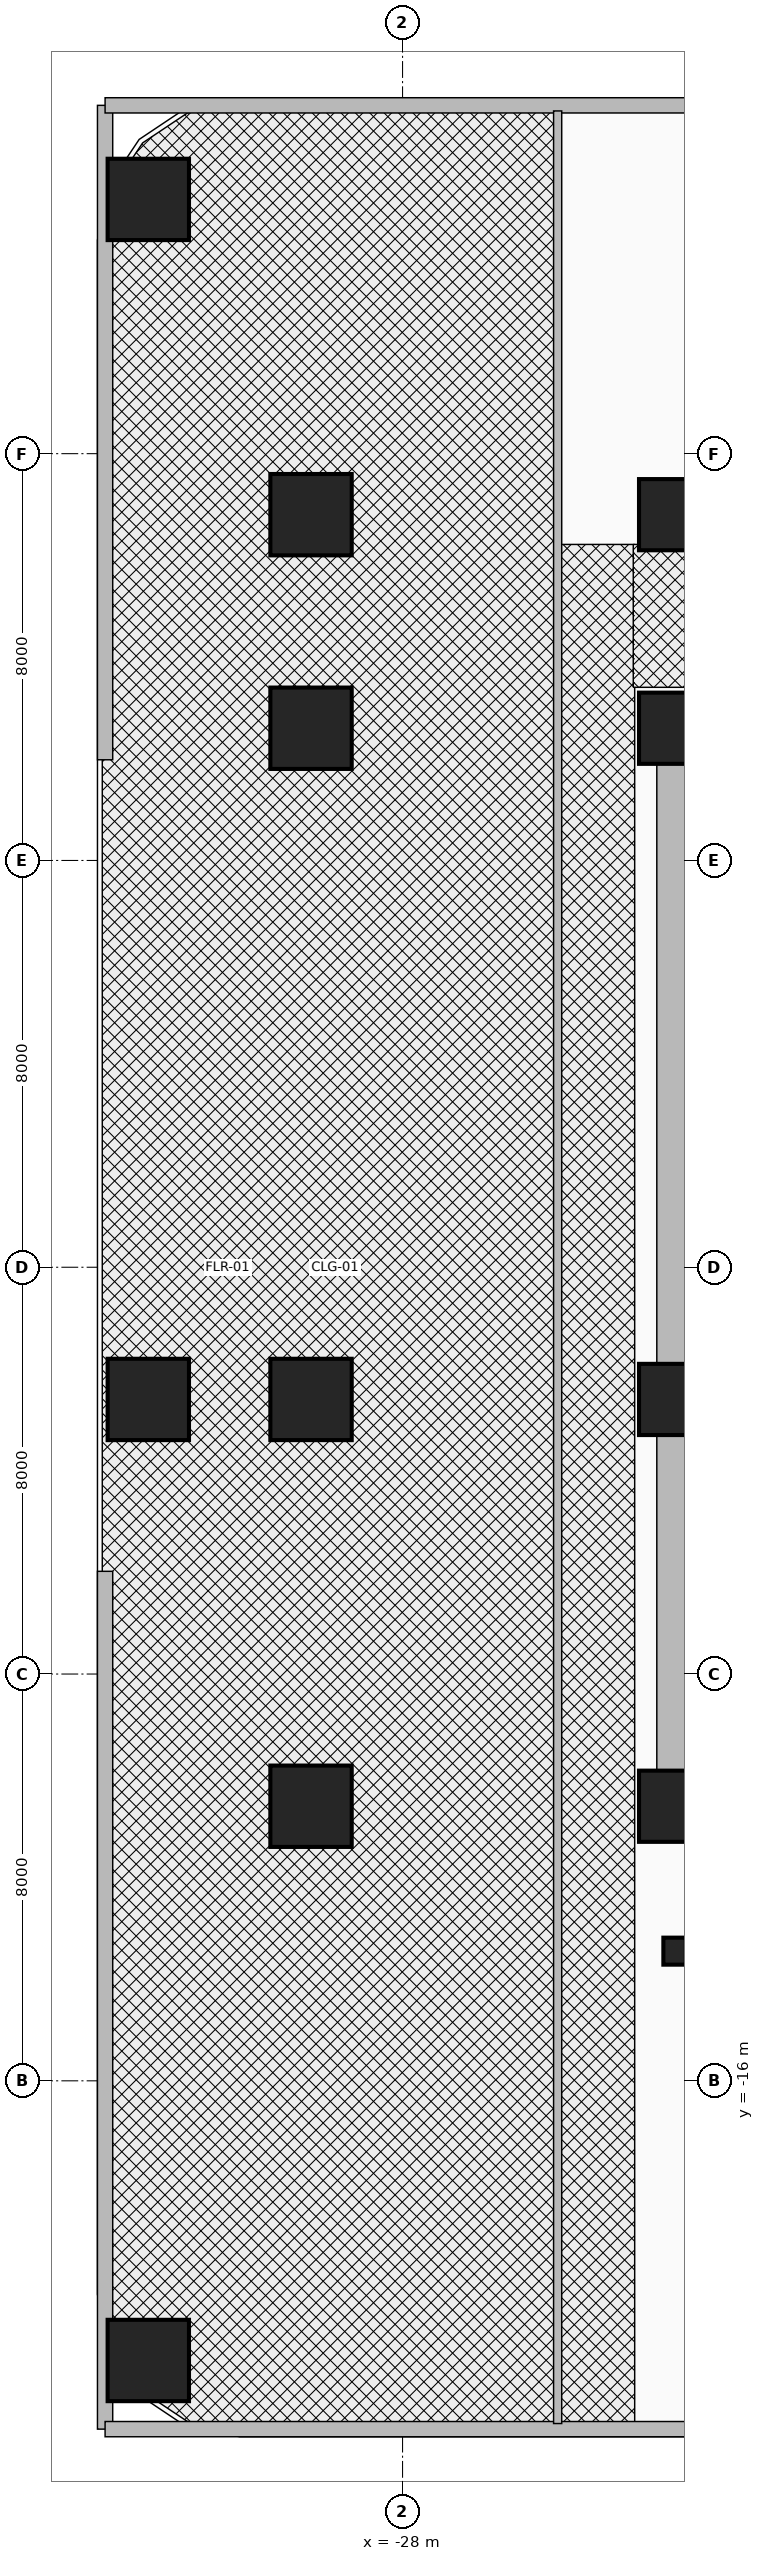
"""IFC4 building model, lengths in metres.
Left out: names, types, materials, properties, quantities, classifications, styles, units other than length and angle.
Written with IfcOpenShell. Run it as: python <this file> out.ifc"""

import sys

from ifc_helpers import new_model, si_unit, direction, frame, frame_2d, origin, origin_2d, place, context, subcontext, project, spatial, rectangle, i_section, extrude, source, transform, mapped, element, fill, save


model = new_model("IFC4")
c1 = context("Model", 3, precision=1e-05, world=origin(), true_north=direction((0.0, 1.0)))
c2 = subcontext(c1, "Body", "Model", "MODEL_VIEW")
j1 = project(units=[si_unit("LENGTHUNIT", "METRE"), si_unit("PLANEANGLEUNIT", "RADIAN")], contexts=[c1])
p1 = place(None, origin())
s1 = spatial("IfcSite", under=j1, at=p1, CompositionType="ELEMENT")
p2 = place(p1, origin())
s2 = spatial("IfcBuilding", under=s1, at=p2, CompositionType="ELEMENT")
p3 = place(p2, frame((0.0, 0.0, 10.4)))
s3 = spatial("IfcBuildingStorey", under=s2, at=p3, CompositionType="ELEMENT", Elevation=10.4)
p4 = place(p3, frame((-22.65, -11.15, 0.0), z_axis=(0.0, 0.0, 1.0), x_axis=(0.0, 1.0, 0.0)))
e1 = element("IfcWall", 1, at=p4, inside=s3, PredefinedType="SHEAR", context=c2, shape_type="SweptSolid", body=[
    extrude(rectangle(XDim=22.3, YDim=0.7, at=frame_2d((11.15, 0.0))), origin(), (0.0, 0.0, 1.0), 4.92),
])
for number, where, z_axis, x_axis in (
    (2, (-22.65, 10.8, 0.0), (0.0, 0.0, 1.0), (1.0, 0.0, 0.0)),
    (3, (-22.65, -10.8, 0.0), (0.0, 0.0, 1.0), (1.0, 0.0, 0.0)),
):
    element("IfcWall", number, at=place(p3, frame(where, z_axis=z_axis, x_axis=x_axis)), inside=s3, PredefinedType="SHEAR", context=c2, shape_type="SweptSolid", body=[
        extrude(rectangle(XDim=10.25, YDim=0.7, at=frame_2d((5.125, 0.0))), origin(), (0.0, 0.0, 1.0), 4.92),
    ])
m1 = source(origin(), c2, "Body", "SweptSolid", [
    extrude(rectangle(XDim=1.6, YDim=1.6, at=origin_2d()), origin(), (0.0, 0.0, 1.0), 5.2),
])
p5 = place(p3, frame((-29.8, -10.6, 0.0), z_axis=(0.0, 0.0, 1.0), x_axis=(1.0, 0.0, 0.0)))
e4 = element("IfcColumn", 4, at=p5, inside=s3, PredefinedType="COLUMN", context=c2, shape_type="MappedRepresentation", body=[
    mapped(m1, transform((0.0, 0.0, 0.0), x_axis=(1.0, 0.0, 0.0), y_axis=(0.0, 1.0, 0.0), z_axis=(0.0, 0.0, 1.0), scale=1.0)),
])
m2 = source(origin(), c2, "Body", "SweptSolid", [
    extrude(rectangle(XDim=1.4, YDim=1.4, at=origin_2d()), origin(), (0.0, 0.0, 1.0), 5.2),
])
p6 = place(p3, frame((-22.65, -10.6, 0.0), z_axis=(0.0, 0.0, 1.0), x_axis=(1.0, 0.0, 0.0)))
e5 = element("IfcColumn", 5, at=p6, inside=s3, PredefinedType="COLUMN", context=c2, shape_type="MappedRepresentation", body=[
    mapped(m2, transform((0.0, 0.0, 0.0), x_axis=(1.0, 0.0, 0.0), y_axis=(0.0, 1.0, 0.0), z_axis=(0.0, 0.0, 1.0), scale=1.0)),
])
p7 = place(p3, frame((-29.8, -2.6, 0.0), z_axis=(0.0, 0.0, 1.0), x_axis=(1.0, 0.0, 0.0)))
e6 = element("IfcColumn", 6, at=p7, inside=s3, PredefinedType="COLUMN", context=c2, shape_type="MappedRepresentation", body=[
    mapped(m1, transform((0.0, 0.0, 0.0), x_axis=(1.0, 0.0, 0.0), y_axis=(0.0, 1.0, 0.0), z_axis=(0.0, 0.0, 1.0), scale=1.0)),
])
p8 = place(p3, frame((-22.65, -2.6, 0.0), z_axis=(0.0, 0.0, 1.0), x_axis=(1.0, 0.0, 0.0)))
e7 = element("IfcColumn", 7, at=p8, inside=s3, PredefinedType="COLUMN", context=c2, shape_type="MappedRepresentation", body=[
    mapped(m2, transform((0.0, 0.0, 0.0), x_axis=(1.0, 0.0, 0.0), y_axis=(0.0, 1.0, 0.0), z_axis=(0.0, 0.0, 1.0), scale=1.0)),
])
p9 = place(p3, frame((-29.8, 10.6, 0.0), z_axis=(0.0, 0.0, 1.0), x_axis=(1.0, 0.0, 0.0)))
e8 = element("IfcColumn", 8, at=p9, inside=s3, PredefinedType="COLUMN", context=c2, shape_type="MappedRepresentation", body=[
    mapped(m1, transform((0.0, 0.0, 0.0), x_axis=(1.0, 0.0, 0.0), y_axis=(0.0, 1.0, 0.0), z_axis=(0.0, 0.0, 1.0), scale=1.0)),
])
p10 = place(p3, frame((-22.65, 10.6, 0.0), z_axis=(0.0, 0.0, 1.0), x_axis=(1.0, 0.0, 0.0)))
e9 = element("IfcColumn", 9, at=p10, inside=s3, PredefinedType="COLUMN", context=c2, shape_type="MappedRepresentation", body=[
    mapped(m2, transform((0.0, 0.0, 0.0), x_axis=(1.0, 0.0, 0.0), y_axis=(0.0, 1.0, 0.0), z_axis=(0.0, 0.0, 1.0), scale=1.0)),
])
p11 = place(p3, frame((-29.8, 14.8, 0.0), z_axis=(0.0, 0.0, 1.0), x_axis=(1.0, 0.0, 0.0)))
e10 = element("IfcColumn", 10, at=p11, inside=s3, PredefinedType="COLUMN", context=c2, shape_type="MappedRepresentation", body=[
    mapped(m1, transform((0.0, 0.0, 0.0), x_axis=(1.0, 0.0, 0.0), y_axis=(0.0, 1.0, 0.0), z_axis=(0.0, 0.0, 1.0), scale=1.0)),
])
p12 = place(p3, frame((-22.65, 14.8, 0.0), z_axis=(0.0, 0.0, 1.0), x_axis=(1.0, 0.0, 0.0)))
e11 = element("IfcColumn", 11, at=p12, inside=s3, PredefinedType="COLUMN", context=c2, shape_type="MappedRepresentation", body=[
    mapped(m2, transform((0.0, 0.0, 0.0), x_axis=(1.0, 0.0, 0.0), y_axis=(0.0, 1.0, 0.0), z_axis=(0.0, 0.0, 1.0), scale=1.0)),
])
m3 = source(origin(), c2, "Body", "SweptSolid", [
    extrude(i_section(OverallWidth=0.442, OverallDepth=0.531, WebThickness=0.066, FlangeThickness=0.106, at=origin_2d()), origin(), (0.0, 0.0, 1.0), 5.2),
])
p13 = place(p3, frame((-22.65, -13.45, 0.0), z_axis=(0.0, 0.0, 1.0), x_axis=(1.0, 0.0, 0.0)))
e12 = element("IfcColumn", 12, at=p13, inside=s3, PredefinedType="COLUMN", context=c2, shape_type="MappedRepresentation", body=[
    mapped(m3, transform((0.0, 0.0, 0.0), x_axis=(1.0, 0.0, 0.0), y_axis=(0.0, 1.0, 0.0), z_axis=(0.0, 0.0, 1.0), scale=1.0)),
])
for number, where, z_axis, x_axis in (
    (13, (-33.0, -21.5, 0.0), (0.0, 0.0, 1.0), (1.0, 0.0, 0.0)),
    (14, (-33.0, -2.6, 0.0), (0.0, 0.0, 1.0), (1.0, 0.0, 0.0)),
    (15, (-33.0, 21.0, 0.0), (0.0, 0.0, 1.0), (1.0, 0.0, 0.0)),
):
    element("IfcColumn", number, at=place(p3, frame(where, z_axis=z_axis, x_axis=x_axis)), inside=s3, PredefinedType="COLUMN", context=c2, shape_type="MappedRepresentation", body=[
        mapped(m1, transform((0.0, 0.0, 0.0), x_axis=(1.0, 0.0, 0.0), y_axis=(0.0, 1.0, 0.0), z_axis=(0.0, 0.0, 1.0), scale=1.0)),
    ])
p14 = place(p3, frame((-33.85, -22.85, 0.0), z_axis=(0.0, 0.0, 1.0), x_axis=(0.0, 1.0, 0.0)))
e16 = element("IfcWall", 16, at=p14, inside=s3, PredefinedType="SOLIDWALL", context=c2, shape_type="SweptSolid", body=[
    extrude(rectangle(XDim=16.87, YDim=0.3, at=frame_2d((8.435, 0.0))), origin(), (0.0, 0.0, 1.0), 4.92),
])
p15 = place(p14, frame((3.0, 0.0, 0.9)))
e17 = element("IfcOpeningElement", 17, at=p15, cuts=e16, PredefinedType="OPENING", context=c2, shape_type="SweptSolid", body=[
    extrude(rectangle(XDim=1.5, YDim=1.75, at=frame_2d((0.75, 0.875))), frame((0.0, 0.165, 0.0), z_axis=(0.0, -1.0, 0.0), x_axis=(1.0, 0.0, 0.0)), (0.0, 0.0, 1.0), 0.33),
])
p16 = place(p14, frame((8.2, 0.0, 0.9)))
e18 = element("IfcOpeningElement", 18, at=p16, cuts=e16, PredefinedType="OPENING", context=c2, shape_type="SweptSolid", body=[
    extrude(rectangle(XDim=1.5, YDim=1.75, at=frame_2d((0.75, 0.875))), frame((0.0, 0.165, 0.0), z_axis=(0.0, -1.0, 0.0), x_axis=(1.0, 0.0, 0.0)), (0.0, 0.0, 1.0), 0.33),
])
p17 = place(p14, frame((13.4, 0.0, 0.9)))
e19 = element("IfcOpeningElement", 19, at=p17, cuts=e16, PredefinedType="OPENING", context=c2, shape_type="SweptSolid", body=[
    extrude(rectangle(XDim=1.5, YDim=1.75, at=frame_2d((0.75, 0.875))), frame((0.0, 0.165, 0.0), z_axis=(0.0, -1.0, 0.0), x_axis=(1.0, 0.0, 0.0)), (0.0, 0.0, 1.0), 0.33),
])
p18 = place(p3, frame((-33.85, 9.98, 0.0), z_axis=(0.0, 0.0, 1.0), x_axis=(0.0, 1.0, 0.0)))
e20 = element("IfcWall", 20, at=p18, inside=s3, PredefinedType="SOLIDWALL", context=c2, shape_type="SweptSolid", body=[
    extrude(rectangle(XDim=12.87, YDim=0.3, at=frame_2d((6.435, 0.0))), origin(), (0.0, 0.0, 1.0), 4.92),
])
p19 = place(p18, frame((3.0, 0.0, 0.9)))
e21 = element("IfcOpeningElement", 21, at=p19, cuts=e20, PredefinedType="OPENING", context=c2, shape_type="SweptSolid", body=[
    extrude(rectangle(XDim=1.5, YDim=1.75, at=frame_2d((0.75, 0.875))), frame((0.0, 0.165, 0.0), z_axis=(0.0, -1.0, 0.0), x_axis=(1.0, 0.0, 0.0)), (0.0, 0.0, 1.0), 0.33),
])
p20 = place(p18, frame((8.2, 0.0, 0.9)))
e22 = element("IfcOpeningElement", 22, at=p20, cuts=e20, PredefinedType="OPENING", context=c2, shape_type="SweptSolid", body=[
    extrude(rectangle(XDim=1.5, YDim=1.75, at=frame_2d((0.75, 0.875))), frame((0.0, 0.165, 0.0), z_axis=(0.0, -1.0, 0.0), x_axis=(1.0, 0.0, 0.0)), (0.0, 0.0, 1.0), 0.33),
])
p21 = place(p3, frame((-33.85, -22.85, 0.0), z_axis=(0.0, 0.0, 1.0), x_axis=(1.0, 0.0, 0.0)))
e23 = element("IfcWall", 23, at=p21, inside=s3, PredefinedType="SOLIDWALL", context=c2, shape_type="SweptSolid", body=[
    extrude(rectangle(XDim=21.7, YDim=0.3, at=frame_2d((10.85, 0.0))), origin(), (0.0, 0.0, 1.0), 4.92),
])
p22 = place(p21, frame((3.2, 0.0, 0.9)))
e24 = element("IfcOpeningElement", 24, at=p22, cuts=e23, PredefinedType="OPENING", context=c2, shape_type="SweptSolid", body=[
    extrude(rectangle(XDim=1.5, YDim=1.75, at=frame_2d((0.75, 0.875))), frame((0.0, 0.165, 0.0), z_axis=(0.0, -1.0, 0.0), x_axis=(1.0, 0.0, 0.0)), (0.0, 0.0, 1.0), 0.33),
])
p23 = place(p21, frame((10.0, 0.0, 0.9)))
e25 = element("IfcOpeningElement", 25, at=p23, cuts=e23, PredefinedType="OPENING", context=c2, shape_type="SweptSolid", body=[
    extrude(rectangle(XDim=1.5, YDim=1.75, at=frame_2d((0.75, 0.875))), frame((0.0, 0.165, 0.0), z_axis=(0.0, -1.0, 0.0), x_axis=(1.0, 0.0, 0.0)), (0.0, 0.0, 1.0), 0.33),
])
p24 = place(p21, frame((17.8, 0.0, 0.9)))
e26 = element("IfcOpeningElement", 26, at=p24, cuts=e23, PredefinedType="OPENING", context=c2, shape_type="SweptSolid", body=[
    extrude(rectangle(XDim=1.5, YDim=1.75, at=frame_2d((0.75, 0.875))), frame((0.0, 0.165, 0.0), z_axis=(0.0, -1.0, 0.0), x_axis=(1.0, 0.0, 0.0)), (0.0, 0.0, 1.0), 0.33),
])
p25 = place(p3, frame((-33.85, 22.85, 0.0), z_axis=(0.0, 0.0, 1.0), x_axis=(1.0, 0.0, 0.0)))
e27 = element("IfcWall", 27, at=p25, inside=s3, PredefinedType="SOLIDWALL", context=c2, shape_type="SweptSolid", body=[
    extrude(rectangle(XDim=23.87, YDim=0.3, at=frame_2d((11.935, 0.0))), origin(), (0.0, 0.0, 1.0), 4.92),
])
p26 = place(p25, frame((3.2, 0.0, 0.9)))
e28 = element("IfcOpeningElement", 28, at=p26, cuts=e27, PredefinedType="OPENING", context=c2, shape_type="SweptSolid", body=[
    extrude(rectangle(XDim=1.5, YDim=1.75, at=frame_2d((0.75, 0.875))), frame((0.0, 0.165, 0.0), z_axis=(0.0, -1.0, 0.0), x_axis=(1.0, 0.0, 0.0)), (0.0, 0.0, 1.0), 0.33),
])
p27 = place(p25, frame((10.0, 0.0, 0.9)))
e29 = element("IfcOpeningElement", 29, at=p27, cuts=e27, PredefinedType="OPENING", context=c2, shape_type="SweptSolid", body=[
    extrude(rectangle(XDim=1.5, YDim=1.75, at=frame_2d((0.75, 0.875))), frame((0.0, 0.165, 0.0), z_axis=(0.0, -1.0, 0.0), x_axis=(1.0, 0.0, 0.0)), (0.0, 0.0, 1.0), 0.33),
])
p28 = place(p25, frame((17.8, 0.0, 0.9)))
e30 = element("IfcOpeningElement", 30, at=p28, cuts=e27, PredefinedType="OPENING", context=c2, shape_type="SweptSolid", body=[
    extrude(rectangle(XDim=1.5, YDim=1.75, at=frame_2d((0.75, 0.875))), frame((0.0, 0.165, 0.0), z_axis=(0.0, -1.0, 0.0), x_axis=(1.0, 0.0, 0.0)), (0.0, 0.0, 1.0), 0.33),
])
p29 = place(p3, frame((-24.95, -22.74, 0.0), z_axis=(0.0, 0.0, 1.0), x_axis=(0.0, 1.0, 0.0)))
e31 = element("IfcWall", 31, at=p29, inside=s3, PredefinedType="PARTITIONING", context=c2, shape_type="SweptSolid", body=[
    extrude(rectangle(XDim=45.48, YDim=0.16, at=frame_2d((22.74, 0.0))), origin(), (0.0, 0.0, 1.0), 3.957),
])
p30 = place(p29, frame((7.0, 0.0, 0.0)))
e32 = element("IfcOpeningElement", 32, at=p30, cuts=e31, PredefinedType="OPENING", context=c2, shape_type="SweptSolid", body=[
    extrude(rectangle(XDim=1.8, YDim=2.15, at=frame_2d((0.9, 1.075))), frame((0.0, 0.095, 0.0), z_axis=(0.0, -1.0, 0.0), x_axis=(1.0, 0.0, 0.0)), (0.0, 0.0, 1.0), 0.19),
])
p31 = place(p29, frame((25.0, 0.0, 0.0)))
e33 = element("IfcOpeningElement", 33, at=p31, cuts=e31, PredefinedType="OPENING", context=c2, shape_type="SweptSolid", body=[
    extrude(rectangle(XDim=1.8, YDim=2.15, at=frame_2d((0.9, 1.075))), frame((0.0, 0.095, 0.0), z_axis=(0.0, -1.0, 0.0), x_axis=(1.0, 0.0, 0.0)), (0.0, 0.0, 1.0), 0.19),
])
p32 = place(p15, origin())
e34 = element("IfcWindow", 34, at=p32, inside=s3, PartitioningType="SINGLE_PANEL", PredefinedType="WINDOW", context=c2, shape_type="SweptSolid", body=[
    extrude(rectangle(XDim=1.5, YDim=1.75, at=frame_2d((0.75, 0.875))), frame((0.0, 0.03, 0.0), z_axis=(0.0, -1.0, 0.0), x_axis=(1.0, 0.0, 0.0)), (0.0, 0.0, 1.0), 0.06),
])
fill(e17, e34)
p33 = place(p16, origin())
e35 = element("IfcWindow", 35, at=p33, inside=s3, PartitioningType="SINGLE_PANEL", PredefinedType="WINDOW", context=c2, shape_type="SweptSolid", body=[
    extrude(rectangle(XDim=1.5, YDim=1.75, at=frame_2d((0.75, 0.875))), frame((0.0, 0.03, 0.0), z_axis=(0.0, -1.0, 0.0), x_axis=(1.0, 0.0, 0.0)), (0.0, 0.0, 1.0), 0.06),
])
fill(e18, e35)
p34 = place(p17, origin())
e36 = element("IfcWindow", 36, at=p34, inside=s3, PartitioningType="SINGLE_PANEL", PredefinedType="WINDOW", context=c2, shape_type="SweptSolid", body=[
    extrude(rectangle(XDim=1.5, YDim=1.75, at=frame_2d((0.75, 0.875))), frame((0.0, 0.03, 0.0), z_axis=(0.0, -1.0, 0.0), x_axis=(1.0, 0.0, 0.0)), (0.0, 0.0, 1.0), 0.06),
])
fill(e19, e36)
p35 = place(p19, origin())
e37 = element("IfcWindow", 37, at=p35, inside=s3, PartitioningType="SINGLE_PANEL", PredefinedType="WINDOW", context=c2, shape_type="SweptSolid", body=[
    extrude(rectangle(XDim=1.5, YDim=1.75, at=frame_2d((0.75, 0.875))), frame((0.0, 0.03, 0.0), z_axis=(0.0, -1.0, 0.0), x_axis=(1.0, 0.0, 0.0)), (0.0, 0.0, 1.0), 0.06),
])
fill(e21, e37)
p36 = place(p20, origin())
e38 = element("IfcWindow", 38, at=p36, inside=s3, PartitioningType="SINGLE_PANEL", PredefinedType="WINDOW", context=c2, shape_type="SweptSolid", body=[
    extrude(rectangle(XDim=1.5, YDim=1.75, at=frame_2d((0.75, 0.875))), frame((0.0, 0.03, 0.0), z_axis=(0.0, -1.0, 0.0), x_axis=(1.0, 0.0, 0.0)), (0.0, 0.0, 1.0), 0.06),
])
fill(e22, e38)
p37 = place(p22, origin())
e39 = element("IfcWindow", 39, at=p37, inside=s3, PartitioningType="SINGLE_PANEL", PredefinedType="WINDOW", context=c2, shape_type="SweptSolid", body=[
    extrude(rectangle(XDim=1.5, YDim=1.75, at=frame_2d((0.75, 0.875))), frame((0.0, 0.03, 0.0), z_axis=(0.0, -1.0, 0.0), x_axis=(1.0, 0.0, 0.0)), (0.0, 0.0, 1.0), 0.06),
])
fill(e24, e39)
p38 = place(p23, origin())
e40 = element("IfcWindow", 40, at=p38, inside=s3, PartitioningType="SINGLE_PANEL", PredefinedType="WINDOW", context=c2, shape_type="SweptSolid", body=[
    extrude(rectangle(XDim=1.5, YDim=1.75, at=frame_2d((0.75, 0.875))), frame((0.0, 0.03, 0.0), z_axis=(0.0, -1.0, 0.0), x_axis=(1.0, 0.0, 0.0)), (0.0, 0.0, 1.0), 0.06),
])
fill(e25, e40)
p39 = place(p26, origin())
e41 = element("IfcWindow", 41, at=p39, inside=s3, PartitioningType="SINGLE_PANEL", PredefinedType="WINDOW", context=c2, shape_type="SweptSolid", body=[
    extrude(rectangle(XDim=1.5, YDim=1.75, at=frame_2d((0.75, 0.875))), frame((0.0, 0.03, 0.0), z_axis=(0.0, -1.0, 0.0), x_axis=(1.0, 0.0, 0.0)), (0.0, 0.0, 1.0), 0.06),
])
fill(e28, e41)
p40 = place(p27, origin())
e42 = element("IfcWindow", 42, at=p40, inside=s3, PartitioningType="SINGLE_PANEL", PredefinedType="WINDOW", context=c2, shape_type="SweptSolid", body=[
    extrude(rectangle(XDim=1.5, YDim=1.75, at=frame_2d((0.75, 0.875))), frame((0.0, 0.03, 0.0), z_axis=(0.0, -1.0, 0.0), x_axis=(1.0, 0.0, 0.0)), (0.0, 0.0, 1.0), 0.06),
])
fill(e29, e42)
p41 = place(p30, origin())
e43 = element("IfcDoor", 43, at=p41, inside=s3, OperationType="DOUBLE_DOOR_SINGLE_SWING", PredefinedType="DOOR", context=c2, shape_type="SweptSolid", body=[
    extrude(rectangle(XDim=1.8, YDim=2.15, at=frame_2d((0.9, 1.075))), frame((0.0, 0.025, 0.0), z_axis=(0.0, -1.0, 0.0), x_axis=(1.0, 0.0, 0.0)), (0.0, 0.0, 1.0), 0.05),
])
fill(e32, e43)
p42 = place(p31, frame((1.8, 0.0, 0.0), z_axis=(0.0, 0.0, 1.0), x_axis=(-1.0, 0.0, 0.0)))
e44 = element("IfcDoor", 44, at=p42, inside=s3, OperationType="DOUBLE_DOOR_SINGLE_SWING", PredefinedType="DOOR", context=c2, shape_type="SweptSolid", body=[
    extrude(rectangle(XDim=1.8, YDim=2.15, at=frame_2d((0.9, 1.075))), frame((0.0, 0.025, 0.0), z_axis=(0.0, -1.0, 0.0), x_axis=(1.0, 0.0, 0.0)), (0.0, 0.0, 1.0), 0.05),
])
fill(e33, e44)
save(model, sys.argv[1])
